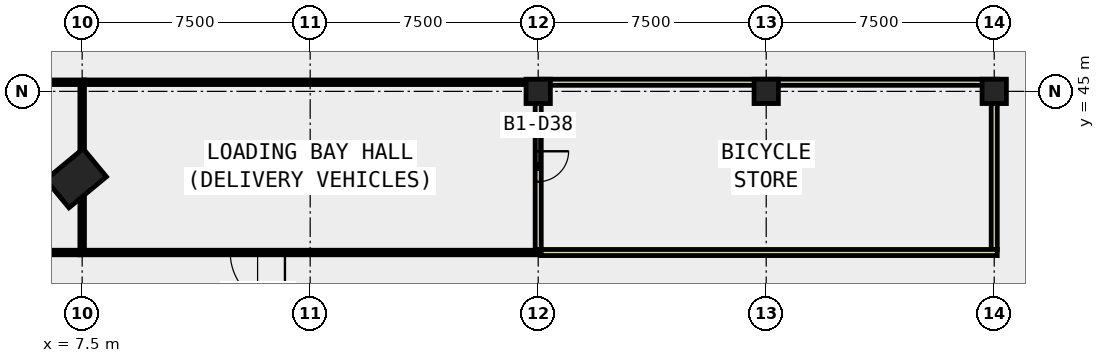
"""IFC4 building model, lengths in metres.
Left out: names, types, materials, properties, quantities, classifications, styles, units other than length and angle.
Written with IfcOpenShell. Run it as: python <this file> out.ifc"""

import sys

from ifc_helpers import new_model, si_unit, direction, frame, frame_2d, origin, origin_2d, place, context, subcontext, project, spatial, rectangle, extrude, element, fill, save


model = new_model("IFC4")
c1 = context("Model", 3, precision=1e-05, world=origin(), true_north=direction((0.0, 1.0)))
c2 = subcontext(c1, "Body", "Model", "MODEL_VIEW")
j1 = project(units=[si_unit("LENGTHUNIT", "METRE"), si_unit("PLANEANGLEUNIT", "RADIAN")], contexts=[c1])
p1 = place(None, origin())
s1 = spatial("IfcSite", under=j1, at=p1, CompositionType="ELEMENT")
p2 = place(p1, origin())
s2 = spatial("IfcBuilding", under=s1, at=p2, CompositionType="ELEMENT")
p3 = place(p2, frame((0.0, 0.0, -5.5)))
s3 = spatial("IfcBuildingStorey", under=s2, at=p3, CompositionType="ELEMENT", Elevation=-5.5)
for number, where, z_axis, x_axis in (
    (1, (22.5, 45.0, -0.42), (0.0, 0.0, 1.0), (1.0, 0.0, 0.0)),
    (2, (30.0, 45.0, -0.42), (0.0, 0.0, 1.0), (1.0, 0.0, 0.0)),
    (3, (37.5, 45.0, -0.42), (0.0, 0.0, 1.0), (1.0, 0.0, 0.0)),
):
    element("IfcColumn", number, at=place(p3, frame(where, z_axis=z_axis, x_axis=x_axis)), inside=s3, PredefinedType="COLUMN", context=c2, shape_type="SweptSolid", body=[
        extrude(rectangle(XDim=0.8, YDim=0.8, at=origin_2d()), origin(), (0.0, 0.0, 1.0), 5.72),
    ])
p4 = place(p3, frame((7.299, 42.144, -0.42), z_axis=(0.0, 0.0, 1.0), x_axis=(-0.637666022163, 0.770312952103, 0.0)))
e4 = element("IfcColumn", 4, at=p4, inside=s3, PredefinedType="COLUMN", context=c2, shape_type="SweptSolid", body=[
    extrude(rectangle(XDim=1.2, YDim=1.6, at=origin_2d()), origin(), (0.0, 0.0, 1.0), 5.42),
])
p5 = place(p3, frame((-7.4, 45.3, 0.0), z_axis=(0.0, 0.0, 1.0), x_axis=(1.0, 0.0, 0.0)))
e5 = element("IfcWall", 5, at=p5, inside=s3, PredefinedType="PARTITIONING", context=c2, shape_type="SweptSolid", body=[
    extrude(rectangle(XDim=14.975, YDim=0.15, at=frame_2d((7.487, 0.0))), origin(), (0.0, 0.0, 1.0), 4.9),
])
p6 = place(p5, frame((8.95, 0.0, 0.0)))
e6 = element("IfcOpeningElement", 6, at=p6, cuts=e5, PredefinedType="OPENING", context=c2, shape_type="SweptSolid", body=[
    extrude(rectangle(XDim=1.8, YDim=2.1, at=frame_2d((0.9, 1.05))), frame((0.0, 0.085, 0.0), z_axis=(0.0, -1.0, 0.0), x_axis=(1.0, 0.0, 0.0)), (0.0, 0.0, 1.0), 0.17),
])
p7 = place(p3, frame((7.425, 39.7, 0.0), z_axis=(0.0, 0.0, 1.0), x_axis=(-1.0, 0.0, 0.0)))
e7 = element("IfcWall", 7, at=p7, inside=s3, PredefinedType="PARTITIONING", context=c2, shape_type="SweptSolid", body=[
    extrude(rectangle(XDim=5.425, YDim=0.15, at=frame_2d((2.712, 0.0))), origin(), (0.0, 0.0, 1.0), 4.9),
])
p8 = place(p3, frame((7.575, 45.3, 0.0), z_axis=(0.0, 0.0, 1.0), x_axis=(1.0, 0.0, 0.0)))
e8 = element("IfcWall", 8, at=p8, inside=s3, PredefinedType="PARTITIONING", context=c2, shape_type="SweptSolid", body=[
    extrude(rectangle(XDim=15.025, YDim=0.15, at=frame_2d((7.513, 0.0))), origin(), (0.0, 0.0, 1.0), 4.9),
])
p9 = place(p3, frame((22.6, 39.7, 0.0), z_axis=(0.0, 0.0, 1.0), x_axis=(-1.0, 0.0, 0.0)))
e9 = element("IfcWall", 9, at=p9, inside=s3, PredefinedType="PARTITIONING", context=c2, shape_type="SweptSolid", body=[
    extrude(rectangle(XDim=15.175, YDim=0.15, at=frame_2d((7.587, 0.0))), origin(), (0.0, 0.0, 1.0), 4.9),
])
p10 = place(p9, frame((8.43, 0.0, 0.0)))
e10 = element("IfcOpeningElement", 10, at=p10, cuts=e9, PredefinedType="OPENING", context=c2, shape_type="SweptSolid", body=[
    extrude(rectangle(XDim=1.8, YDim=2.1, at=frame_2d((0.9, 1.05))), frame((0.0, 0.085, 0.0), z_axis=(0.0, -1.0, 0.0), x_axis=(1.0, 0.0, 0.0)), (0.0, 0.0, 1.0), 0.17),
])
p11 = place(p3, frame((22.6, 45.3, 0.0), z_axis=(0.0, 0.0, 1.0), x_axis=(1.0, 0.0, 0.0)))
e11 = element("IfcWall", 11, at=p11, inside=s3, PredefinedType="PARTITIONING", context=c2, shape_type="SweptSolid", body=[
    extrude(rectangle(XDim=15.0, YDim=0.2, at=frame_2d((7.5, 0.0))), origin(), (0.0, 0.0, 1.0), 4.9),
])
p12 = place(p3, frame((37.5, 45.2, 0.0), z_axis=(0.0, 0.0, 1.0), x_axis=(0.0, -1.0, 0.0)))
e12 = element("IfcWall", 12, at=p12, inside=s3, PredefinedType="PARTITIONING", context=c2, shape_type="SweptSolid", body=[
    extrude(rectangle(XDim=5.4, YDim=0.2, at=frame_2d((2.7, 0.0))), origin(), (0.0, 0.0, 1.0), 4.9),
])
p13 = place(p3, frame((37.6, 39.7, 0.0), z_axis=(0.0, 0.0, 1.0), x_axis=(-1.0, 0.0, 0.0)))
e13 = element("IfcWall", 13, at=p13, inside=s3, PredefinedType="PARTITIONING", context=c2, shape_type="SweptSolid", body=[
    extrude(rectangle(XDim=15.0, YDim=0.2, at=frame_2d((7.5, 0.0))), origin(), (0.0, 0.0, 1.0), 4.9),
])
p14 = place(p3, frame((7.5, 45.225, 0.0), z_axis=(0.0, 0.0, 1.0), x_axis=(0.0, -1.0, 0.0)))
e14 = element("IfcWall", 14, at=p14, inside=s3, PredefinedType="PARTITIONING", context=c2, shape_type="SweptSolid", body=[
    extrude(rectangle(XDim=5.525, YDim=0.15, at=frame_2d((2.763, 0.0))), origin(), (0.0, 0.0, 1.0), 4.9),
])
p15 = place(p3, frame((22.5, 45.2, 0.0), z_axis=(0.0, 0.0, 1.0), x_axis=(0.0, -1.0, 0.0)))
e15 = element("IfcWall", 15, at=p15, inside=s3, PredefinedType="PARTITIONING", context=c2, shape_type="SweptSolid", body=[
    extrude(rectangle(XDim=5.4, YDim=0.2, at=frame_2d((2.7, 0.0))), origin(), (0.0, 0.0, 1.0), 4.9),
])
p16 = place(p15, frame((2.17, 0.0, 0.0)))
e16 = element("IfcOpeningElement", 16, at=p16, cuts=e15, PredefinedType="OPENING", context=c2, shape_type="SweptSolid", body=[
    extrude(rectangle(XDim=1.0, YDim=2.1, at=frame_2d((0.5, 1.05))), frame((0.0, 0.11, 0.0), z_axis=(0.0, -1.0, 0.0), x_axis=(1.0, 0.0, 0.0)), (0.0, 0.0, 1.0), 0.22),
])
p17 = place(p10, origin())
e17 = element("IfcDoor", 17, at=p17, inside=s3, OperationType="DOUBLE_DOOR_SINGLE_SWING", PredefinedType="DOOR", context=c2, shape_type="SweptSolid", body=[
    extrude(rectangle(XDim=1.8, YDim=2.1, at=frame_2d((0.9, 1.05))), frame((0.0, 0.025, 0.0), z_axis=(0.0, -1.0, 0.0), x_axis=(1.0, 0.0, 0.0)), (0.0, 0.0, 1.0), 0.05),
])
fill(e10, e17)
p18 = place(p16, origin())
e18 = element("IfcDoor", 18, at=p18, inside=s3, OperationType="SINGLE_SWING_RIGHT", PredefinedType="DOOR", context=c2, shape_type="SweptSolid", body=[
    extrude(rectangle(XDim=1.0, YDim=2.1, at=frame_2d((0.5, 1.05))), frame((0.0, 0.025, 0.0), z_axis=(0.0, -1.0, 0.0), x_axis=(1.0, 0.0, 0.0)), (0.0, 0.0, 1.0), 0.05),
])
fill(e16, e18)
save(model, sys.argv[1])
